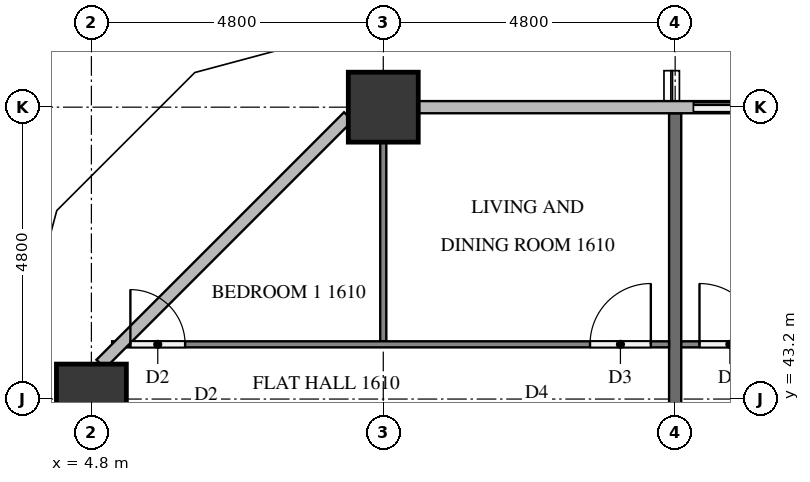
"""IFC4 building model, lengths in metres.
Left out: names, types, materials, properties, quantities, classifications, styles, units other than length and angle.
Written with IfcOpenShell. Run it as: python <this file> out.ifc"""

import sys

from ifc_helpers import new_model, si_unit, direction, frame, frame_2d, origin, origin_2d, place, context, subcontext, project, spatial, rectangle, extrude, element, fill, save


model = new_model("IFC4")
c1 = context("Model", 3, precision=1e-05, world=origin(), true_north=direction((0.0, 1.0)))
c2 = subcontext(c1, "Body", "Model", "MODEL_VIEW")
j1 = project(units=[si_unit("LENGTHUNIT", "METRE"), si_unit("PLANEANGLEUNIT", "RADIAN")], contexts=[c1])
p1 = place(None, origin())
s1 = spatial("IfcSite", under=j1, at=p1, CompositionType="ELEMENT")
p2 = place(p1, origin())
s2 = spatial("IfcBuilding", under=s1, at=p2, CompositionType="ELEMENT")
p3 = place(p2, frame((0.0, 0.0, 66.3)))
s3 = spatial("IfcBuildingStorey", under=s2, at=p3, CompositionType="ELEMENT", Elevation=66.3)
for number, where, z_axis, x_axis in (
    (1, (9.6, 48.0, 0.0), (0.0, 0.0, 1.0), (1.0, 0.0, 0.0)),
    (2, (4.8, 43.2, 0.0), (0.0, 0.0, 1.0), (1.0, 0.0, 0.0)),
):
    element("IfcColumn", number, at=place(p3, frame(where, z_axis=z_axis, x_axis=x_axis)), inside=s3, PredefinedType="COLUMN", context=c2, shape_type="SweptSolid", body=[
        extrude(rectangle(XDim=1.15, YDim=1.15, at=origin_2d()), origin(), (0.0, 0.0, 1.0), 3.2),
    ])
p4 = place(p3, frame((16.8, 48.0, 0.0), z_axis=(0.0, 0.0, 1.0), x_axis=(-1.0, 0.0, 0.0)))
e3 = element("IfcWall", 3, at=p4, inside=s3, PredefinedType="SOLIDWALL", context=c2, shape_type="SweptSolid", body=[
    extrude(rectangle(XDim=2.4, YDim=0.15, at=frame_2d((1.2, 0.0))), origin(), (0.0, 0.0, 1.0), 3.2),
])
p5 = place(p4, frame((0.3, 0.0, 0.0)))
e4 = element("IfcOpeningElement", 4, at=p5, cuts=e3, PredefinedType="OPENING", context=c2, shape_type="SweptSolid", body=[
    extrude(rectangle(XDim=1.8, YDim=2.4, at=frame_2d((0.9, 1.2))), frame((0.0, 0.085, 0.0), z_axis=(0.0, -1.0, 0.0), x_axis=(1.0, 0.0, 0.0)), (0.0, 0.0, 1.0), 0.17),
])
p6 = place(p3, frame((14.4, 47.9, 0.0), z_axis=(0.0, 0.0, 1.0), x_axis=(0.0, -1.0, 0.0)))
e5 = element("IfcWall", 5, at=p6, inside=s3, PredefinedType="PARTITIONING", context=c2, shape_type="SweptSolid", body=[
    extrude(rectangle(XDim=7.0, YDim=0.2, at=frame_2d((3.5, 0.0))), origin(), (0.0, 0.0, 1.0), 3.2),
])
p7 = place(p3, frame((14.5, 44.1, 0.0), z_axis=(0.0, 0.0, 1.0), x_axis=(1.0, 0.0, 0.0)))
e6 = element("IfcWall", 6, at=p7, inside=s3, PredefinedType="PARTITIONING", context=c2, shape_type="SweptSolid", body=[
    extrude(rectangle(XDim=14.2, YDim=0.1, at=frame_2d((7.1, 0.0))), origin(), (0.0, 0.0, 1.0), 3.2),
])
p8 = place(p7, frame((9.85, 0.0, 0.0)))
e7 = element("IfcOpeningElement", 7, at=p8, cuts=e6, PredefinedType="OPENING", context=c2, shape_type="SweptSolid", body=[
    extrude(rectangle(XDim=0.9, YDim=2.1, at=frame_2d((0.45, 1.05))), frame((0.0, 0.06, 0.0), z_axis=(0.0, -1.0, 0.0), x_axis=(1.0, 0.0, 0.0)), (0.0, 0.0, 1.0), 0.12),
])
p9 = place(p7, frame((8.25, 0.0, 0.0)))
e8 = element("IfcOpeningElement", 8, at=p9, cuts=e6, PredefinedType="OPENING", context=c2, shape_type="SweptSolid", body=[
    extrude(rectangle(XDim=0.9, YDim=2.1, at=frame_2d((0.45, 1.05))), frame((0.0, 0.06, 0.0), z_axis=(0.0, -1.0, 0.0), x_axis=(1.0, 0.0, 0.0)), (0.0, 0.0, 1.0), 0.12),
])
p10 = place(p7, frame((0.3, 0.0, 0.0)))
e9 = element("IfcOpeningElement", 9, at=p10, cuts=e6, PredefinedType="OPENING", context=c2, shape_type="SweptSolid", body=[
    extrude(rectangle(XDim=1.0, YDim=2.1, at=frame_2d((0.5, 1.05))), frame((0.0, 0.06, 0.0), z_axis=(0.0, -1.0, 0.0), x_axis=(1.0, 0.0, 0.0)), (0.0, 0.0, 1.0), 0.12),
])
p11 = place(p3, frame((9.6, 44.15, 0.0), z_axis=(0.0, 0.0, 1.0), x_axis=(0.0, 1.0, 0.0)))
e10 = element("IfcWall", 10, at=p11, inside=s3, PredefinedType="PARTITIONING", context=c2, shape_type="SweptSolid", body=[
    extrude(rectangle(XDim=3.275, YDim=0.1, at=frame_2d((1.638, 0.0))), origin(), (0.0, 0.0, 1.0), 3.2),
])
p12 = place(p3, frame((5.141, 44.1, 0.0), z_axis=(0.0, 0.0, 1.0), x_axis=(1.0, 0.0, 0.0)))
e11 = element("IfcWall", 11, at=p12, inside=s3, PredefinedType="PARTITIONING", context=c2, shape_type="SweptSolid", body=[
    extrude(rectangle(XDim=9.159, YDim=0.1, at=frame_2d((4.58, 0.0))), origin(), (0.0, 0.0, 1.0), 3.2),
])
p13 = place(p12, frame((7.859, 0.0, 0.0)))
e12 = element("IfcOpeningElement", 12, at=p13, cuts=e11, PredefinedType="OPENING", context=c2, shape_type="SweptSolid", body=[
    extrude(rectangle(XDim=1.0, YDim=2.1, at=frame_2d((0.5, 1.05))), frame((0.0, 0.06, 0.0), z_axis=(0.0, -1.0, 0.0), x_axis=(1.0, 0.0, 0.0)), (0.0, 0.0, 1.0), 0.12),
])
p14 = place(p12, frame((0.3, 0.0, 0.0)))
e13 = element("IfcOpeningElement", 13, at=p14, cuts=e11, PredefinedType="OPENING", context=c2, shape_type="SweptSolid", body=[
    extrude(rectangle(XDim=0.9, YDim=2.1, at=frame_2d((0.45, 1.05))), frame((0.0, 0.06, 0.0), z_axis=(0.0, -1.0, 0.0), x_axis=(1.0, 0.0, 0.0)), (0.0, 0.0, 1.0), 0.12),
])
p15 = place(p5, origin())
e14 = element("IfcDoor", 14, at=p15, inside=s3, OperationType="SLIDING_TO_LEFT", PredefinedType="DOOR", context=c2, shape_type="SweptSolid", body=[
    extrude(rectangle(XDim=1.8, YDim=2.4, at=frame_2d((0.9, 1.2))), frame((0.0, 0.025, 0.0), z_axis=(0.0, -1.0, 0.0), x_axis=(1.0, 0.0, 0.0)), (0.0, 0.0, 1.0), 0.05),
])
fill(e4, e14)
p16 = place(p10, origin())
e15 = element("IfcDoor", 15, at=p16, inside=s3, OperationType="SINGLE_SWING_LEFT", PredefinedType="DOOR", context=c2, shape_type="SweptSolid", body=[
    extrude(rectangle(XDim=1.0, YDim=2.1, at=frame_2d((0.5, 1.05))), frame((0.0, 0.025, 0.0), z_axis=(0.0, -1.0, 0.0), x_axis=(1.0, 0.0, 0.0)), (0.0, 0.0, 1.0), 0.05),
])
fill(e9, e15)
p17 = place(p13, origin())
e16 = element("IfcDoor", 16, at=p17, inside=s3, OperationType="SINGLE_SWING_RIGHT", PredefinedType="DOOR", context=c2, shape_type="SweptSolid", body=[
    extrude(rectangle(XDim=1.0, YDim=2.1, at=frame_2d((0.5, 1.05))), frame((0.0, 0.025, 0.0), z_axis=(0.0, -1.0, 0.0), x_axis=(1.0, 0.0, 0.0)), (0.0, 0.0, 1.0), 0.05),
])
fill(e12, e16)
p18 = place(p14, origin())
e17 = element("IfcDoor", 17, at=p18, inside=s3, OperationType="SINGLE_SWING_LEFT", PredefinedType="DOOR", context=c2, shape_type="SweptSolid", body=[
    extrude(rectangle(XDim=0.9, YDim=2.1, at=frame_2d((0.45, 1.05))), frame((0.0, 0.025, 0.0), z_axis=(0.0, -1.0, 0.0), x_axis=(1.0, 0.0, 0.0)), (0.0, 0.0, 1.0), 0.05),
])
fill(e13, e17)
save(model, sys.argv[1])
